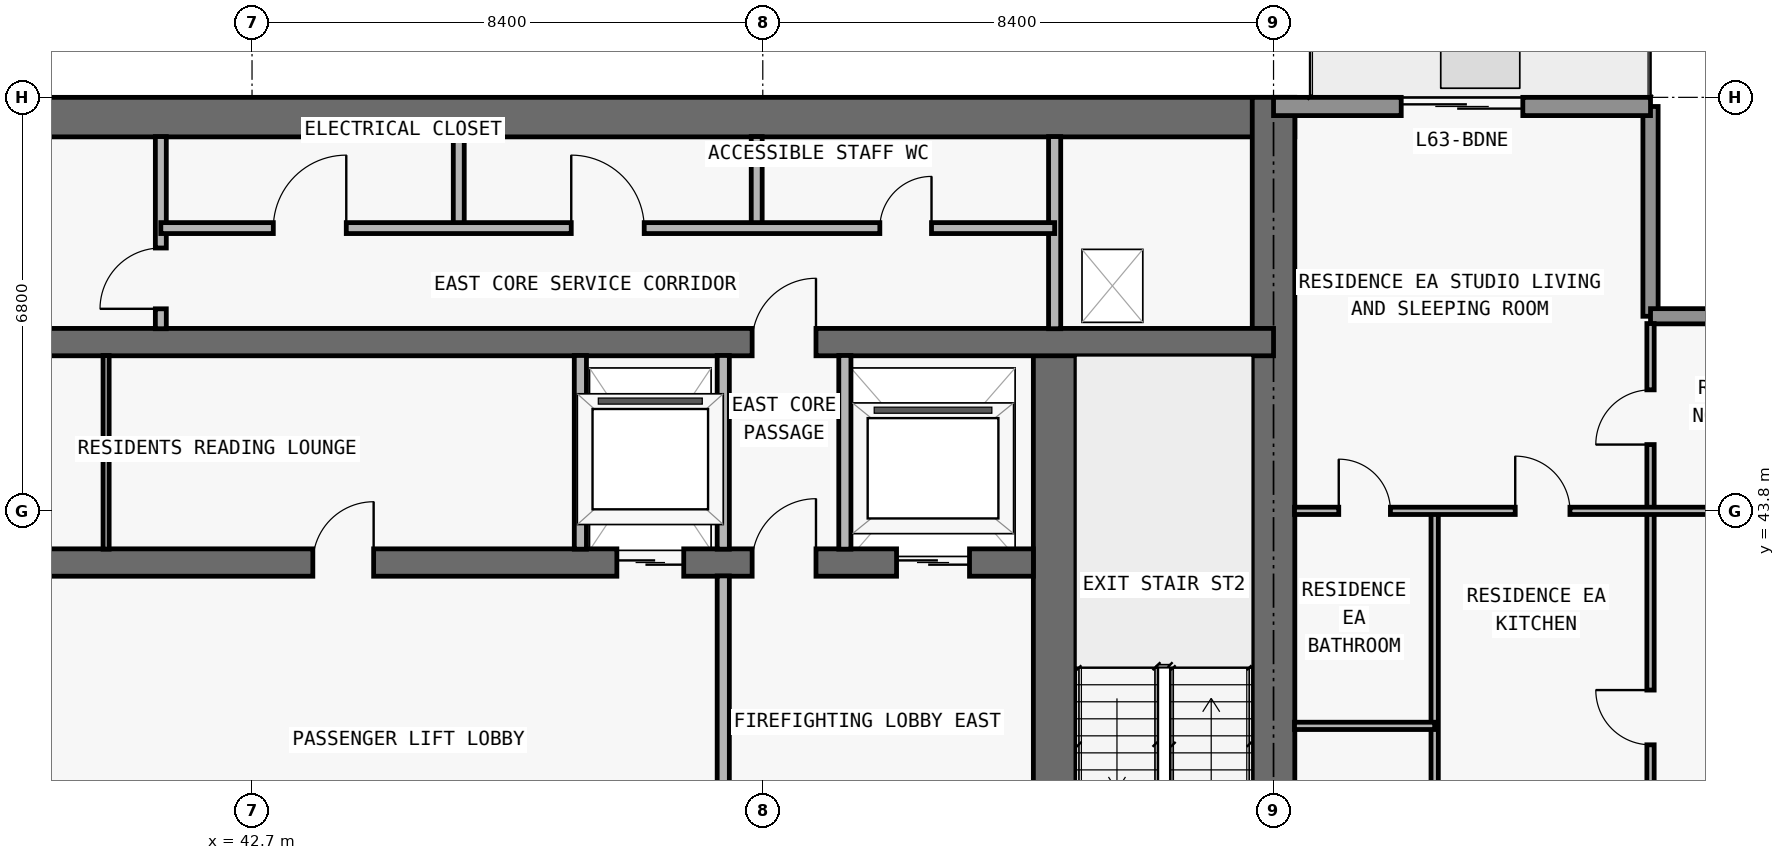
"""IFC4 building model, lengths in metres.
Left out: names, types, materials, properties, quantities, classifications, styles, units other than length and angle.
Written with IfcOpenShell. Run it as: python <this file> out.ifc"""

import sys

from ifc_helpers import new_model, si_unit, direction, frame, frame_2d, origin, place, context, subcontext, project, spatial, rectangle, extrude, element, fill, save


model = new_model("IFC4")
c1 = context("Model", 3, precision=1e-05, world=origin(), true_north=direction((0.0, 1.0)))
c2 = subcontext(c1, "Body", "Model", "MODEL_VIEW")
j1 = project(units=[si_unit("LENGTHUNIT", "METRE"), si_unit("PLANEANGLEUNIT", "RADIAN")], contexts=[c1])
p1 = place(None, origin())
s1 = spatial("IfcSite", under=j1, at=p1, CompositionType="ELEMENT")
p2 = place(p1, origin())
s2 = spatial("IfcBuilding", under=s1, at=p2, CompositionType="ELEMENT")
p3 = place(p2, frame((0.0, 0.0, 226.5)))
s3 = spatial("IfcBuildingStorey", under=s2, at=p3, CompositionType="ELEMENT", Elevation=226.5)
p4 = place(p3, frame((17.95, 50.275, 0.0), z_axis=(0.0, 0.0, 1.0), x_axis=(1.0, 0.0, 0.0)))
e1 = element("IfcWall", 1, at=p4, inside=s3, PredefinedType="SHEAR", context=c2, shape_type="SweptSolid", body=[
    extrude(rectangle(XDim=41.9, YDim=0.65, at=frame_2d((20.95, 0.0))), origin(), (0.0, 0.0, 1.0), 3.05),
])
p5 = place(p3, frame((59.5, 36.65, 0.0), z_axis=(0.0, 0.0, 1.0), x_axis=(0.0, 1.0, 0.0)))
e2 = element("IfcWall", 2, at=p5, inside=s3, PredefinedType="SHEAR", context=c2, shape_type="SweptSolid", body=[
    extrude(rectangle(XDim=13.95, YDim=0.7, at=frame_2d((6.975, 0.0))), origin(), (0.0, 0.0, 1.0), 3.05),
])
p6 = place(p3, frame((55.9, 37.0, 0.0), z_axis=(0.0, 0.0, 1.0), x_axis=(0.0, 1.0, 0.0)))
e3 = element("IfcWall", 3, at=p6, inside=s3, PredefinedType="SHEAR", context=c2, shape_type="SweptSolid", body=[
    extrude(rectangle(XDim=9.575, YDim=0.7, at=frame_2d((4.788, 0.0))), origin(), (0.0, 0.0, 1.0), 3.05),
])
p7 = place(p6, frame((0.55, 0.0, 0.0)))
e4 = element("IfcOpeningElement", 4, at=p7, cuts=e3, PredefinedType="OPENING", context=c2, shape_type="SweptSolid", body=[
    extrude(rectangle(XDim=1.1, YDim=2.15, at=frame_2d((0.55, 1.075))), frame((0.0, 0.36, 0.0), z_axis=(0.0, -1.0, 0.0), x_axis=(1.0, 0.0, 0.0)), (0.0, 0.0, 1.0), 0.72),
])
p8 = place(p3, frame((22.25, 42.95, 0.0), z_axis=(0.0, 0.0, 1.0), x_axis=(1.0, 0.0, 0.0)))
e5 = element("IfcWall", 5, at=p8, inside=s3, PredefinedType="SHEAR", context=c2, shape_type="SweptSolid", body=[
    extrude(rectangle(XDim=33.3, YDim=0.45, at=frame_2d((16.65, 0.0))), origin(), (0.0, 0.0, 1.0), 3.05),
])
p9 = place(p8, frame((1.05, 0.0, 0.0)))
e6 = element("IfcOpeningElement", 6, at=p9, cuts=e5, PredefinedType="OPENING", context=c2, shape_type="SweptSolid", body=[
    extrude(rectangle(XDim=1.2, YDim=2.2, at=frame_2d((0.6, 1.1))), frame((0.0, 0.235, 0.0), z_axis=(0.0, -1.0, 0.0), x_axis=(1.0, 0.0, 0.0)), (0.0, 0.0, 1.0), 0.47),
])
p10 = place(p8, frame((31.05, 0.0, 0.0)))
e7 = element("IfcOpeningElement", 7, at=p10, cuts=e5, PredefinedType="OPENING", context=c2, shape_type="SweptSolid", body=[
    extrude(rectangle(XDim=1.2, YDim=2.2, at=frame_2d((0.6, 1.1))), frame((0.0, 0.235, 0.0), z_axis=(0.0, -1.0, 0.0), x_axis=(1.0, 0.0, 0.0)), (0.0, 0.0, 1.0), 0.47),
])
p11 = place(p8, frame((26.45, 0.0, 0.0)))
e8 = element("IfcOpeningElement", 8, at=p11, cuts=e5, PredefinedType="OPENING", context=c2, shape_type="SweptSolid", body=[
    extrude(rectangle(XDim=1.1, YDim=2.2, at=frame_2d((0.55, 1.1))), frame((0.0, 0.235, 0.0), z_axis=(0.0, -1.0, 0.0), x_axis=(1.0, 0.0, 0.0)), (0.0, 0.0, 1.0), 0.47),
])
p12 = place(p8, frame((5.95, 0.0, 0.0)))
e9 = element("IfcOpeningElement", 9, at=p12, cuts=e5, PredefinedType="OPENING", context=c2, shape_type="SweptSolid", body=[
    extrude(rectangle(XDim=1.1, YDim=2.2, at=frame_2d((0.55, 1.1))), frame((0.0, 0.235, 0.0), z_axis=(0.0, -1.0, 0.0), x_axis=(1.0, 0.0, 0.0)), (0.0, 0.0, 1.0), 0.47),
])
p13 = place(p8, frame((3.625, 0.0, 0.0)))
e10 = element("IfcOpeningElement", 10, at=p13, cuts=e5, PredefinedType="OPENING", context=c2, shape_type="SweptSolid", body=[
    extrude(rectangle(XDim=1.05, YDim=2.15, at=frame_2d((0.525, 1.075))), frame((0.0, 0.235, 0.0), z_axis=(0.0, -1.0, 0.0), x_axis=(1.0, 0.0, 0.0)), (0.0, 0.0, 1.0), 0.47),
])
p14 = place(p8, frame((28.675, 0.0, 0.0)))
e11 = element("IfcOpeningElement", 11, at=p14, cuts=e5, PredefinedType="OPENING", context=c2, shape_type="SweptSolid", body=[
    extrude(rectangle(XDim=1.05, YDim=2.15, at=frame_2d((0.525, 1.075))), frame((0.0, 0.235, 0.0), z_axis=(0.0, -1.0, 0.0), x_axis=(1.0, 0.0, 0.0)), (0.0, 0.0, 1.0), 0.47),
])
p15 = place(p8, frame((14.7, 0.0, 0.0)))
e12 = element("IfcOpeningElement", 12, at=p15, cuts=e5, PredefinedType="OPENING", context=c2, shape_type="SweptSolid", body=[
    extrude(rectangle(XDim=1.0, YDim=2.2, at=frame_2d((0.5, 1.1))), frame((0.0, 0.235, 0.0), z_axis=(0.0, -1.0, 0.0), x_axis=(1.0, 0.0, 0.0)), (0.0, 0.0, 1.0), 0.47),
])
p16 = place(p8, frame((21.45, 0.0, 0.0)))
e13 = element("IfcOpeningElement", 13, at=p16, cuts=e5, PredefinedType="OPENING", context=c2, shape_type="SweptSolid", body=[
    extrude(rectangle(XDim=1.0, YDim=2.2, at=frame_2d((0.5, 1.1))), frame((0.0, 0.235, 0.0), z_axis=(0.0, -1.0, 0.0), x_axis=(1.0, 0.0, 0.0)), (0.0, 0.0, 1.0), 0.47),
])
p17 = place(p3, frame((18.3, 46.575, 0.0), z_axis=(0.0, 0.0, 1.0), x_axis=(1.0, 0.0, 0.0)))
e14 = element("IfcWall", 14, at=p17, inside=s3, PredefinedType="SHEAR", context=c2, shape_type="SweptSolid", body=[
    extrude(rectangle(XDim=41.2, YDim=0.45, at=frame_2d((20.6, 0.0))), origin(), (0.0, 0.0, 1.0), 3.05),
])
p18 = place(p17, frame((7.6, 0.0, 0.0)))
e15 = element("IfcOpeningElement", 15, at=p18, cuts=e14, PredefinedType="OPENING", context=c2, shape_type="SweptSolid", body=[
    extrude(rectangle(XDim=1.0, YDim=2.2, at=frame_2d((0.5, 1.1))), frame((0.0, 0.235, 0.0), z_axis=(0.0, -1.0, 0.0), x_axis=(1.0, 0.0, 0.0)), (0.0, 0.0, 1.0), 0.47),
])
p19 = place(p17, frame((32.625, 0.0, 0.0)))
e16 = element("IfcOpeningElement", 16, at=p19, cuts=e14, PredefinedType="OPENING", context=c2, shape_type="SweptSolid", body=[
    extrude(rectangle(XDim=1.05, YDim=2.15, at=frame_2d((0.525, 1.075))), frame((0.0, 0.235, 0.0), z_axis=(0.0, -1.0, 0.0), x_axis=(1.0, 0.0, 0.0)), (0.0, 0.0, 1.0), 0.47),
])
p20 = place(p3, frame((65.7, 50.45, 0.0), z_axis=(0.0, 0.0, 1.0), x_axis=(0.0, -1.0, 0.0)))
e17 = element("IfcWall", 17, at=p20, inside=s3, PredefinedType="ELEMENTEDWALL", context=c2, shape_type="SweptSolid", body=[
    extrude(rectangle(XDim=3.45, YDim=0.25, at=frame_2d((1.725, 0.0))), origin(), (0.0, 0.0, 1.0), 3.05),
])
p21 = place(p3, frame((65.7, 47.0, 0.0), z_axis=(0.0, 0.0, 1.0), x_axis=(1.0, 0.0, 0.0)))
e18 = element("IfcWall", 18, at=p21, inside=s3, PredefinedType="ELEMENTEDWALL", context=c2, shape_type="SweptSolid", body=[
    extrude(rectangle(XDim=3.85, YDim=0.25, at=frame_2d((1.925, 0.0))), origin(), (0.0, 0.0, 1.0), 3.05),
])
p22 = place(p3, frame((59.5, 50.45, 0.0), z_axis=(0.0, 0.0, 1.0), x_axis=(1.0, 0.0, 0.0)))
e19 = element("IfcWall", 19, at=p22, inside=s3, PredefinedType="STANDARD", context=c2, shape_type="SweptSolid", body=[
    extrude(rectangle(XDim=6.2, YDim=0.3, at=frame_2d((3.1, 0.0))), origin(), (0.0, 0.0, 1.0), 3.05),
])
p23 = place(p22, frame((2.1, 0.0, 0.0)))
e20 = element("IfcOpeningElement", 20, at=p23, cuts=e19, PredefinedType="OPENING", context=c2, shape_type="SweptSolid", body=[
    extrude(rectangle(XDim=2.0, YDim=2.3, at=frame_2d((1.0, 1.15))), frame((0.0, 0.16, 0.0), z_axis=(0.0, -1.0, 0.0), x_axis=(1.0, 0.0, 0.0)), (0.0, 0.0, 1.0), 0.32),
])
p24 = place(p3, frame((40.3, 43.17, 0.0), z_axis=(0.0, 0.0, 1.0), x_axis=(0.0, 1.0, 0.0)))
e21 = element("IfcWall", 21, at=p24, inside=s3, PredefinedType="MOVABLE", context=c2, shape_type="SweptSolid", body=[
    extrude(rectangle(XDim=3.185, YDim=0.1, at=frame_2d((1.593, 0.0))), origin(), (0.0, 0.0, 1.0), 3.05),
])
p25 = place(p3, frame((41.2, 46.795, 0.0), z_axis=(0.0, 0.0, 1.0), x_axis=(0.0, 1.0, 0.0)))
e22 = element("IfcWall", 22, at=p25, inside=s3, PredefinedType="PARTITIONING", context=c2, shape_type="SweptSolid", body=[
    extrude(rectangle(XDim=3.16, YDim=0.18, at=frame_2d((1.58, 0.0))), origin(), (0.0, 0.0, 1.0), 3.05),
])
p26 = place(p25, frame((0.327, 0.0, 0.0)))
e23 = element("IfcOpeningElement", 23, at=p26, cuts=e22, PredefinedType="OPENING", context=c2, shape_type="SweptSolid", body=[
    extrude(rectangle(XDim=1.0, YDim=2.2, at=frame_2d((0.5, 1.1))), frame((0.0, 0.1, 0.0), z_axis=(0.0, -1.0, 0.0), x_axis=(1.0, 0.0, 0.0)), (0.0, 0.0, 1.0), 0.2),
])
p27 = place(p3, frame((46.1, 48.45, 0.0), z_axis=(0.0, 0.0, 1.0), x_axis=(0.0, 1.0, 0.0)))
e24 = element("IfcWall", 24, at=p27, inside=s3, PredefinedType="PARTITIONING", context=c2, shape_type="SweptSolid", body=[
    extrude(rectangle(XDim=1.505, YDim=0.18, at=frame_2d((0.752, 0.0))), origin(), (0.0, 0.0, 1.0), 3.05),
])
p28 = place(p3, frame((48.1, 43.17, 0.0), z_axis=(0.0, 0.0, 1.0), x_axis=(0.0, 1.0, 0.0)))
e25 = element("IfcWall", 25, at=p28, inside=s3, PredefinedType="PARTITIONING", context=c2, shape_type="SweptSolid", body=[
    extrude(rectangle(XDim=3.185, YDim=0.2, at=frame_2d((1.593, 0.0))), origin(), (0.0, 0.0, 1.0), 3.05),
])
p29 = place(p3, frame((50.45, 37.345, 0.0), z_axis=(0.0, 0.0, 1.0), x_axis=(0.0, 1.0, 0.0)))
e26 = element("IfcWall", 26, at=p29, inside=s3, PredefinedType="PARTITIONING", context=c2, shape_type="SweptSolid", body=[
    extrude(rectangle(XDim=5.385, YDim=0.2, at=frame_2d((2.692, 0.0))), origin(), (0.0, 0.0, 1.0), 3.05),
])
p30 = place(p3, frame((50.45, 43.17, 0.0), z_axis=(0.0, 0.0, 1.0), x_axis=(0.0, 1.0, 0.0)))
e27 = element("IfcWall", 27, at=p30, inside=s3, PredefinedType="PARTITIONING", context=c2, shape_type="SweptSolid", body=[
    extrude(rectangle(XDim=3.185, YDim=0.2, at=frame_2d((1.593, 0.0))), origin(), (0.0, 0.0, 1.0), 3.05),
])
p31 = place(p3, frame((51.0, 48.45, 0.0), z_axis=(0.0, 0.0, 1.0), x_axis=(0.0, 1.0, 0.0)))
e28 = element("IfcWall", 28, at=p31, inside=s3, PredefinedType="PARTITIONING", context=c2, shape_type="SweptSolid", body=[
    extrude(rectangle(XDim=1.505, YDim=0.18, at=frame_2d((0.752, 0.0))), origin(), (0.0, 0.0, 1.0), 3.05),
])
p32 = place(p3, frame((52.45, 43.17, 0.0), z_axis=(0.0, 0.0, 1.0), x_axis=(0.0, 1.0, 0.0)))
e29 = element("IfcWall", 29, at=p32, inside=s3, PredefinedType="PARTITIONING", context=c2, shape_type="SweptSolid", body=[
    extrude(rectangle(XDim=3.185, YDim=0.2, at=frame_2d((1.593, 0.0))), origin(), (0.0, 0.0, 1.0), 3.05),
])
p33 = place(p3, frame((55.9, 46.795, 0.0), z_axis=(0.0, 0.0, 1.0), x_axis=(0.0, 1.0, 0.0)))
e30 = element("IfcWall", 30, at=p33, inside=s3, PredefinedType="PARTITIONING", context=c2, shape_type="SweptSolid", body=[
    extrude(rectangle(XDim=3.16, YDim=0.2, at=frame_2d((1.58, 0.0))), origin(), (0.0, 0.0, 1.0), 3.05),
])
p34 = place(p3, frame((62.15, 37.0, 0.0), z_axis=(0.0, 0.0, 1.0), x_axis=(0.0, 1.0, 0.0)))
e31 = element("IfcWall", 31, at=p34, inside=s3, PredefinedType="PARTITIONING", context=c2, shape_type="SweptSolid", body=[
    extrude(rectangle(XDim=6.8, YDim=0.12, at=frame_2d((3.4, 0.0))), origin(), (0.0, 0.0, 1.0), 3.05),
])
p35 = place(p34, frame((1.207, 0.0, 0.0)))
e32 = element("IfcOpeningElement", 32, at=p35, cuts=e31, PredefinedType="OPENING", context=c2, shape_type="SweptSolid", body=[
    extrude(rectangle(XDim=0.85, YDim=2.1, at=frame_2d((0.425, 1.05))), frame((0.0, 0.07, 0.0), z_axis=(0.0, -1.0, 0.0), x_axis=(1.0, 0.0, 0.0)), (0.0, 0.0, 1.0), 0.14),
])
p36 = place(p3, frame((65.7, 37.005, 0.0), z_axis=(0.0, 0.0, 1.0), x_axis=(0.0, 1.0, 0.0)))
e33 = element("IfcWall", 33, at=p36, inside=s3, PredefinedType="PARTITIONING", context=c2, shape_type="SweptSolid", body=[
    extrude(rectangle(XDim=9.875, YDim=0.12, at=frame_2d((4.938, 0.0))), origin(), (0.0, 0.0, 1.0), 3.05),
])
p37 = place(p36, frame((2.948, 0.0, 0.0)))
e34 = element("IfcOpeningElement", 34, at=p37, cuts=e33, PredefinedType="OPENING", context=c2, shape_type="SweptSolid", body=[
    extrude(rectangle(XDim=0.9, YDim=2.15, at=frame_2d((0.45, 1.075))), frame((0.0, 0.07, 0.0), z_axis=(0.0, -1.0, 0.0), x_axis=(1.0, 0.0, 0.0)), (0.0, 0.0, 1.0), 0.14),
])
p38 = place(p36, frame((7.885, 0.0, 0.0)))
e35 = element("IfcOpeningElement", 35, at=p38, cuts=e33, PredefinedType="OPENING", context=c2, shape_type="SweptSolid", body=[
    extrude(rectangle(XDim=0.9, YDim=2.15, at=frame_2d((0.45, 1.075))), frame((0.0, 0.07, 0.0), z_axis=(0.0, -1.0, 0.0), x_axis=(1.0, 0.0, 0.0)), (0.0, 0.0, 1.0), 0.14),
])
p39 = place(p3, frame((59.845, 40.264, 0.0), z_axis=(0.0, 0.0, 1.0), x_axis=(1.0, 0.0, 0.0)))
e36 = element("IfcWall", 36, at=p39, inside=s3, PredefinedType="PARTITIONING", context=c2, shape_type="SweptSolid", body=[
    extrude(rectangle(XDim=2.305, YDim=0.12, at=frame_2d((1.152, 0.0))), origin(), (0.0, 0.0, 1.0), 3.05),
])
p40 = place(p3, frame((59.845, 43.8, 0.0), z_axis=(0.0, 0.0, 1.0), x_axis=(1.0, 0.0, 0.0)))
e37 = element("IfcWall", 37, at=p40, inside=s3, PredefinedType="PARTITIONING", context=c2, shape_type="SweptSolid", body=[
    extrude(rectangle(XDim=9.56, YDim=0.12, at=frame_2d((4.78, 0.0))), origin(), (0.0, 0.0, 1.0), 2.418),
])
p41 = place(p40, frame((3.63, 0.0, 0.0)))
e38 = element("IfcOpeningElement", 38, at=p41, cuts=e37, PredefinedType="OPENING", context=c2, shape_type="SweptSolid", body=[
    extrude(rectangle(XDim=0.9, YDim=2.15, at=frame_2d((0.45, 1.075))), frame((0.0, 0.07, 0.0), z_axis=(0.0, -1.0, 0.0), x_axis=(1.0, 0.0, 0.0)), (0.0, 0.0, 1.0), 0.14),
])
p42 = place(p40, frame((0.728, 0.0, 0.0)))
e39 = element("IfcOpeningElement", 39, at=p42, cuts=e37, PredefinedType="OPENING", context=c2, shape_type="SweptSolid", body=[
    extrude(rectangle(XDim=0.85, YDim=2.1, at=frame_2d((0.425, 1.05))), frame((0.0, 0.07, 0.0), z_axis=(0.0, -1.0, 0.0), x_axis=(1.0, 0.0, 0.0)), (0.0, 0.0, 1.0), 0.14),
])
p43 = place(p3, frame((41.2, 48.45, 0.0), z_axis=(0.0, 0.0, 1.0), x_axis=(1.0, 0.0, 0.0)))
e40 = element("IfcWall", 40, at=p43, inside=s3, PredefinedType="PARTITIONING", context=c2, shape_type="SweptSolid", body=[
    extrude(rectangle(XDim=14.7, YDim=0.18, at=frame_2d((7.35, 0.0))), origin(), (0.0, 0.0, 1.0), 3.05),
])
p44 = place(p43, frame((1.85, 0.0, 0.0)))
e41 = element("IfcOpeningElement", 41, at=p44, cuts=e40, PredefinedType="OPENING", context=c2, shape_type="SweptSolid", body=[
    extrude(rectangle(XDim=1.2, YDim=2.2, at=frame_2d((0.6, 1.1))), frame((0.0, 0.1, 0.0), z_axis=(0.0, -1.0, 0.0), x_axis=(1.0, 0.0, 0.0)), (0.0, 0.0, 1.0), 0.2),
])
p45 = place(p43, frame((6.75, 0.0, 0.0)))
e42 = element("IfcOpeningElement", 42, at=p45, cuts=e40, PredefinedType="OPENING", context=c2, shape_type="SweptSolid", body=[
    extrude(rectangle(XDim=1.2, YDim=2.2, at=frame_2d((0.6, 1.1))), frame((0.0, 0.1, 0.0), z_axis=(0.0, -1.0, 0.0), x_axis=(1.0, 0.0, 0.0)), (0.0, 0.0, 1.0), 0.2),
])
p46 = place(p43, frame((11.825, 0.0, 0.0)))
e43 = element("IfcOpeningElement", 43, at=p46, cuts=e40, PredefinedType="OPENING", context=c2, shape_type="SweptSolid", body=[
    extrude(rectangle(XDim=0.85, YDim=2.1, at=frame_2d((0.425, 1.05))), frame((0.0, 0.1, 0.0), z_axis=(0.0, -1.0, 0.0), x_axis=(1.0, 0.0, 0.0)), (0.0, 0.0, 1.0), 0.2),
])
p47 = place(p23, origin())
e44 = element("IfcDoor", 44, at=p47, inside=s3, OperationType="DOUBLE_DOOR_SLIDING", PredefinedType="DOOR", context=c2, shape_type="SweptSolid", body=[
    extrude(rectangle(XDim=2.0, YDim=2.3, at=frame_2d((1.0, 1.15))), frame((0.0, 0.025, 0.0), z_axis=(0.0, -1.0, 0.0), x_axis=(1.0, 0.0, 0.0)), (0.0, 0.0, 1.0), 0.05),
])
fill(e20, e44)
p48 = place(p10, origin())
e45 = element("IfcDoor", 45, at=p48, inside=s3, OperationType="DOUBLE_DOOR_SLIDING", PredefinedType="DOOR", context=c2, shape_type="SweptSolid", body=[
    extrude(rectangle(XDim=1.2, YDim=2.2, at=frame_2d((0.6, 1.1))), frame((0.0, 0.025, 0.0), z_axis=(0.0, -1.0, 0.0), x_axis=(1.0, 0.0, 0.0)), (0.0, 0.0, 1.0), 0.05),
])
fill(e7, e45)
p49 = place(p11, origin())
e46 = element("IfcDoor", 46, at=p49, inside=s3, OperationType="DOUBLE_DOOR_SLIDING", PredefinedType="DOOR", context=c2, shape_type="SweptSolid", body=[
    extrude(rectangle(XDim=1.1, YDim=2.2, at=frame_2d((0.55, 1.1))), frame((0.0, 0.025, 0.0), z_axis=(0.0, -1.0, 0.0), x_axis=(1.0, 0.0, 0.0)), (0.0, 0.0, 1.0), 0.05),
])
fill(e8, e46)
p50 = place(p14, origin())
e47 = element("IfcDoor", 47, at=p50, inside=s3, OperationType="SINGLE_SWING_RIGHT", PredefinedType="DOOR", context=c2, shape_type="SweptSolid", body=[
    extrude(rectangle(XDim=1.05, YDim=2.15, at=frame_2d((0.525, 1.075))), frame((0.0, 0.025, 0.0), z_axis=(0.0, -1.0, 0.0), x_axis=(1.0, 0.0, 0.0)), (0.0, 0.0, 1.0), 0.05),
])
fill(e11, e47)
p51 = place(p16, origin())
e48 = element("IfcDoor", 48, at=p51, inside=s3, OperationType="SINGLE_SWING_RIGHT", PredefinedType="DOOR", context=c2, shape_type="SweptSolid", body=[
    extrude(rectangle(XDim=1.0, YDim=2.2, at=frame_2d((0.5, 1.1))), frame((0.0, 0.025, 0.0), z_axis=(0.0, -1.0, 0.0), x_axis=(1.0, 0.0, 0.0)), (0.0, 0.0, 1.0), 0.05),
])
fill(e13, e48)
p52 = place(p19, origin())
e49 = element("IfcDoor", 49, at=p52, inside=s3, OperationType="SINGLE_SWING_RIGHT", PredefinedType="DOOR", context=c2, shape_type="SweptSolid", body=[
    extrude(rectangle(XDim=1.05, YDim=2.15, at=frame_2d((0.525, 1.075))), frame((0.0, 0.025, 0.0), z_axis=(0.0, -1.0, 0.0), x_axis=(1.0, 0.0, 0.0)), (0.0, 0.0, 1.0), 0.05),
])
fill(e16, e49)
p53 = place(p26, origin())
e50 = element("IfcDoor", 50, at=p53, inside=s3, OperationType="SINGLE_SWING_LEFT", PredefinedType="DOOR", context=c2, shape_type="SweptSolid", body=[
    extrude(rectangle(XDim=1.0, YDim=2.2, at=frame_2d((0.5, 1.1))), frame((0.0, 0.025, 0.0), z_axis=(0.0, -1.0, 0.0), x_axis=(1.0, 0.0, 0.0)), (0.0, 0.0, 1.0), 0.05),
])
fill(e23, e50)
p54 = place(p44, origin())
e51 = element("IfcDoor", 51, at=p54, inside=s3, OperationType="SINGLE_SWING_RIGHT", PredefinedType="DOOR", context=c2, shape_type="SweptSolid", body=[
    extrude(rectangle(XDim=1.2, YDim=2.2, at=frame_2d((0.6, 1.1))), frame((0.0, 0.025, 0.0), z_axis=(0.0, -1.0, 0.0), x_axis=(1.0, 0.0, 0.0)), (0.0, 0.0, 1.0), 0.05),
])
fill(e41, e51)
p55 = place(p45, origin())
e52 = element("IfcDoor", 52, at=p55, inside=s3, OperationType="SINGLE_SWING_LEFT", PredefinedType="DOOR", context=c2, shape_type="SweptSolid", body=[
    extrude(rectangle(XDim=1.2, YDim=2.2, at=frame_2d((0.6, 1.1))), frame((0.0, 0.025, 0.0), z_axis=(0.0, -1.0, 0.0), x_axis=(1.0, 0.0, 0.0)), (0.0, 0.0, 1.0), 0.05),
])
fill(e42, e52)
p56 = place(p46, origin())
e53 = element("IfcDoor", 53, at=p56, inside=s3, OperationType="SINGLE_SWING_RIGHT", PredefinedType="DOOR", context=c2, shape_type="SweptSolid", body=[
    extrude(rectangle(XDim=0.85, YDim=2.1, at=frame_2d((0.425, 1.05))), frame((0.0, 0.025, 0.0), z_axis=(0.0, -1.0, 0.0), x_axis=(1.0, 0.0, 0.0)), (0.0, 0.0, 1.0), 0.05),
])
fill(e43, e53)
p57 = place(p41, origin())
e54 = element("IfcDoor", 54, at=p57, inside=s3, OperationType="SINGLE_SWING_LEFT", PredefinedType="DOOR", context=c2, shape_type="SweptSolid", body=[
    extrude(rectangle(XDim=0.9, YDim=2.15, at=frame_2d((0.45, 1.075))), frame((0.0, 0.025, 0.0), z_axis=(0.0, -1.0, 0.0), x_axis=(1.0, 0.0, 0.0)), (0.0, 0.0, 1.0), 0.05),
])
fill(e38, e54)
p58 = place(p42, origin())
e55 = element("IfcDoor", 55, at=p58, inside=s3, OperationType="SINGLE_SWING_LEFT", PredefinedType="DOOR", context=c2, shape_type="SweptSolid", body=[
    extrude(rectangle(XDim=0.85, YDim=2.1, at=frame_2d((0.425, 1.05))), frame((0.0, 0.025, 0.0), z_axis=(0.0, -1.0, 0.0), x_axis=(1.0, 0.0, 0.0)), (0.0, 0.0, 1.0), 0.05),
])
fill(e39, e55)
p59 = place(p37, origin())
e56 = element("IfcDoor", 56, at=p59, inside=s3, OperationType="SINGLE_SWING_RIGHT", PredefinedType="DOOR", context=c2, shape_type="SweptSolid", body=[
    extrude(rectangle(XDim=0.9, YDim=2.15, at=frame_2d((0.45, 1.075))), frame((0.0, 0.025, 0.0), z_axis=(0.0, -1.0, 0.0), x_axis=(1.0, 0.0, 0.0)), (0.0, 0.0, 1.0), 0.05),
])
fill(e34, e56)
p60 = place(p38, origin())
e57 = element("IfcDoor", 57, at=p60, inside=s3, OperationType="SINGLE_SWING_LEFT", PredefinedType="DOOR", context=c2, shape_type="SweptSolid", body=[
    extrude(rectangle(XDim=0.9, YDim=2.15, at=frame_2d((0.45, 1.075))), frame((0.0, 0.025, 0.0), z_axis=(0.0, -1.0, 0.0), x_axis=(1.0, 0.0, 0.0)), (0.0, 0.0, 1.0), 0.05),
])
fill(e35, e57)
save(model, sys.argv[1])
